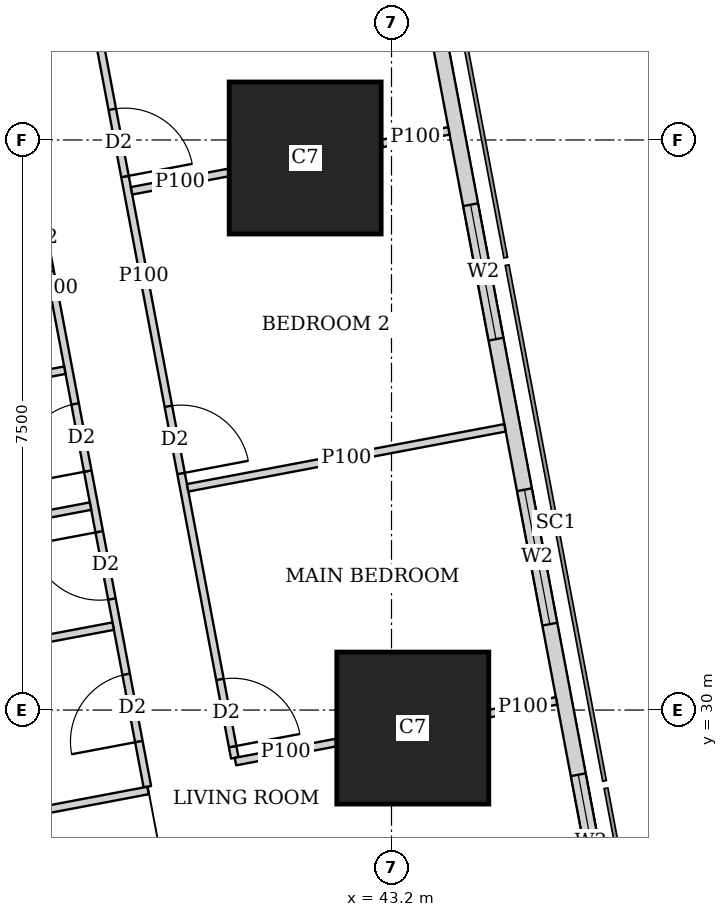
"""IFC4 building model, lengths in metres.
Left out: names, types, materials, properties, quantities, classifications, styles, units other than length and angle.
Written with IfcOpenShell. Run it as: python <this file> out.ifc"""

import sys

from ifc_helpers import new_model, si_unit, direction, frame, frame_2d, origin, origin_2d, place, context, subcontext, project, spatial, rectangle, extrude, element, fill, save


model = new_model("IFC4")
c1 = context("Model", 3, precision=1e-05, world=origin(), true_north=direction((0.0, 1.0)))
c2 = subcontext(c1, "Body", "Model", "MODEL_VIEW")
j1 = project(units=[si_unit("LENGTHUNIT", "METRE"), si_unit("PLANEANGLEUNIT", "RADIAN")], contexts=[c1])
p1 = place(None, origin())
s1 = spatial("IfcSite", under=j1, at=p1, CompositionType="ELEMENT")
p2 = place(p1, origin())
s2 = spatial("IfcBuilding", under=s1, at=p2, CompositionType="ELEMENT")
p3 = place(p2, frame((0.0, 0.0, 266.6)))
s3 = spatial("IfcBuildingStorey", under=s2, at=p3, CompositionType="ELEMENT", Elevation=266.6)
for number, where, z_axis, x_axis in (
    (1, (43.48, 29.763, 0.0), (0.0, 0.0, 1.0), (1.0, 0.0, 0.0)),
    (2, (42.064, 37.263, 0.0), (0.0, 0.0, 1.0), (1.0, 0.0, 0.0)),
):
    element("IfcColumn", number, at=place(p3, frame(where, z_axis=z_axis, x_axis=x_axis)), inside=s3, PredefinedType="COLUMN", context=c2, shape_type="SweptSolid", body=[
        extrude(rectangle(XDim=2.0, YDim=2.0, at=origin_2d()), origin(), (0.0, 0.0, 1.0), 3.75),
    ])
p4 = place(p3, frame((49.684, 7.832, 0.0), z_axis=(0.0, 0.0, 1.0), x_axis=(-0.185616669694, 0.982622232565, 0.0)))
e3 = element("IfcWall", 3, at=p4, inside=s3, PredefinedType="SOLIDWALL", context=c2, shape_type="SweptSolid", body=[
    extrude(rectangle(XDim=36.0, YDim=0.2, at=frame_2d((18.0, 0.0))), origin(), (0.0, 0.0, 1.0), 3.5),
])
p5 = place(p4, frame((2.518, 0.0, 0.9)))
e4 = element("IfcOpeningElement", 4, at=p5, cuts=e3, PredefinedType="OPENING", context=c2, shape_type="SweptSolid", body=[
    extrude(rectangle(XDim=2.4, YDim=1.5, at=frame_2d((1.2, 0.75))), frame((0.0, 0.11, 0.0), z_axis=(0.0, -1.0, 0.0), x_axis=(1.0, 0.0, 0.0)), (0.0, 0.0, 1.0), 0.22),
])
p6 = place(p4, frame((8.444, 0.0, 0.9)))
e5 = element("IfcOpeningElement", 5, at=p6, cuts=e3, PredefinedType="OPENING", context=c2, shape_type="SweptSolid", body=[
    extrude(rectangle(XDim=1.8, YDim=1.5, at=frame_2d((0.9, 0.75))), frame((0.0, 0.11, 0.0), z_axis=(0.0, -1.0, 0.0), x_axis=(1.0, 0.0, 0.0)), (0.0, 0.0, 1.0), 0.22),
])
p7 = place(p4, frame((12.261, 0.0, 0.9)))
e6 = element("IfcOpeningElement", 6, at=p7, cuts=e3, PredefinedType="OPENING", context=c2, shape_type="SweptSolid", body=[
    extrude(rectangle(XDim=1.8, YDim=1.5, at=frame_2d((0.9, 0.75))), frame((0.0, 0.11, 0.0), z_axis=(0.0, -1.0, 0.0), x_axis=(1.0, 0.0, 0.0)), (0.0, 0.0, 1.0), 0.22),
])
p8 = place(p4, frame((16.078, 0.0, 0.9)))
e7 = element("IfcOpeningElement", 7, at=p8, cuts=e3, PredefinedType="OPENING", context=c2, shape_type="SweptSolid", body=[
    extrude(rectangle(XDim=1.8, YDim=1.5, at=frame_2d((0.9, 0.75))), frame((0.0, 0.11, 0.0), z_axis=(0.0, -1.0, 0.0), x_axis=(1.0, 0.0, 0.0)), (0.0, 0.0, 1.0), 0.22),
])
p9 = place(p4, frame((19.894, 0.0, 0.9)))
e8 = element("IfcOpeningElement", 8, at=p9, cuts=e3, PredefinedType="OPENING", context=c2, shape_type="SweptSolid", body=[
    extrude(rectangle(XDim=1.8, YDim=1.5, at=frame_2d((0.9, 0.75))), frame((0.0, 0.11, 0.0), z_axis=(0.0, -1.0, 0.0), x_axis=(1.0, 0.0, 0.0)), (0.0, 0.0, 1.0), 0.22),
])
p10 = place(p4, frame((23.71, 0.0, 0.9)))
e9 = element("IfcOpeningElement", 9, at=p10, cuts=e3, PredefinedType="OPENING", context=c2, shape_type="SweptSolid", body=[
    extrude(rectangle(XDim=1.8, YDim=1.5, at=frame_2d((0.9, 0.75))), frame((0.0, 0.11, 0.0), z_axis=(0.0, -1.0, 0.0), x_axis=(1.0, 0.0, 0.0)), (0.0, 0.0, 1.0), 0.22),
])
p11 = place(p4, frame((27.526, 0.0, 0.9)))
e10 = element("IfcOpeningElement", 10, at=p11, cuts=e3, PredefinedType="OPENING", context=c2, shape_type="SweptSolid", body=[
    extrude(rectangle(XDim=1.8, YDim=1.5, at=frame_2d((0.9, 0.75))), frame((0.0, 0.11, 0.0), z_axis=(0.0, -1.0, 0.0), x_axis=(1.0, 0.0, 0.0)), (0.0, 0.0, 1.0), 0.22),
])
p12 = place(p4, frame((32.046, 0.0, 0.9)))
e11 = element("IfcOpeningElement", 11, at=p12, cuts=e3, PredefinedType="OPENING", context=c2, shape_type="SweptSolid", body=[
    extrude(rectangle(XDim=1.8, YDim=1.5, at=frame_2d((0.9, 0.75))), frame((0.0, 0.11, 0.0), z_axis=(0.0, -1.0, 0.0), x_axis=(1.0, 0.0, 0.0)), (0.0, 0.0, 1.0), 0.22),
])
p13 = place(p3, frame((34.036, 42.186, 0.0), z_axis=(0.0, 0.0, 1.0), x_axis=(0.185593518645, -0.9826266055, 0.0)))
e12 = element("IfcWall", 12, at=p13, inside=s3, PredefinedType="SOLIDWALL", context=c2, shape_type="SweptSolid", body=[
    extrude(rectangle(XDim=35.961, YDim=0.15, at=frame_2d((17.98, 0.0))), origin(), (0.0, 0.0, 1.0), 2.5),
])
p14 = place(p13, frame((15.529, 0.0, 0.0)))
e13 = element("IfcOpeningElement", 13, at=p14, cuts=e12, PredefinedType="OPENING", context=c2, shape_type="SweptSolid", body=[
    extrude(rectangle(XDim=1.0, YDim=2.1, at=frame_2d((0.5, 1.05))), frame((0.0, 0.085, 0.0), z_axis=(0.0, -1.0, 0.0), x_axis=(1.0, 0.0, 0.0)), (0.0, 0.0, 1.0), 0.17),
])
p15 = place(p13, frame((19.345, 0.0, 0.0)))
e14 = element("IfcOpeningElement", 14, at=p15, cuts=e12, PredefinedType="OPENING", context=c2, shape_type="SweptSolid", body=[
    extrude(rectangle(XDim=1.0, YDim=2.1, at=frame_2d((0.5, 1.05))), frame((0.0, 0.085, 0.0), z_axis=(0.0, -1.0, 0.0), x_axis=(1.0, 0.0, 0.0)), (0.0, 0.0, 1.0), 0.17),
])
p16 = place(p13, frame((30.594, 0.0, 0.0)))
e15 = element("IfcOpeningElement", 15, at=p16, cuts=e12, PredefinedType="OPENING", context=c2, shape_type="SweptSolid", body=[
    extrude(rectangle(XDim=1.0, YDim=2.1, at=frame_2d((0.5, 1.05))), frame((0.0, 0.085, 0.0), z_axis=(0.0, -1.0, 0.0), x_axis=(1.0, 0.0, 0.0)), (0.0, 0.0, 1.0), 0.17),
])
p17 = place(p3, frame((38.744, 42.045, 0.0), z_axis=(0.0, 0.0, 1.0), x_axis=(0.185614085367, -0.982622720739, 0.0)))
e16 = element("IfcWall", 16, at=p17, inside=s3, PredefinedType="PARTITIONING", context=c2, shape_type="SweptSolid", body=[
    extrude(rectangle(XDim=12.898, YDim=0.1, at=frame_2d((6.449, 0.0))), origin(), (0.0, 0.0, 1.0), 2.5),
])
p18 = place(p17, frame((11.848, 0.0, 0.0)))
e17 = element("IfcOpeningElement", 17, at=p18, cuts=e16, PredefinedType="OPENING", context=c2, shape_type="SweptSolid", body=[
    extrude(rectangle(XDim=0.9, YDim=2.1, at=frame_2d((0.45, 1.05))), frame((0.0, 0.06, 0.0), z_axis=(0.0, -1.0, 0.0), x_axis=(1.0, 0.0, 0.0)), (0.0, 0.0, 1.0), 0.12),
])
p19 = place(p17, frame((8.191, 0.0, 0.0)))
e18 = element("IfcOpeningElement", 18, at=p19, cuts=e16, PredefinedType="OPENING", context=c2, shape_type="SweptSolid", body=[
    extrude(rectangle(XDim=0.9, YDim=2.1, at=frame_2d((0.45, 1.05))), frame((0.0, 0.06, 0.0), z_axis=(0.0, -1.0, 0.0), x_axis=(1.0, 0.0, 0.0)), (0.0, 0.0, 1.0), 0.12),
])
p20 = place(p17, frame((4.215, 0.0, 0.0)))
e19 = element("IfcOpeningElement", 19, at=p20, cuts=e16, PredefinedType="OPENING", context=c2, shape_type="SweptSolid", body=[
    extrude(rectangle(XDim=0.9, YDim=2.1, at=frame_2d((0.45, 1.05))), frame((0.0, 0.06, 0.0), z_axis=(0.0, -1.0, 0.0), x_axis=(1.0, 0.0, 0.0)), (0.0, 0.0, 1.0), 0.12),
])
p21 = place(p3, frame((37.511, 42.109, 0.0), z_axis=(0.0, 0.0, 1.0), x_axis=(0.185550464988, -0.982634736279, 0.0)))
e20 = element("IfcWall", 20, at=p21, inside=s3, PredefinedType="PARTITIONING", context=c2, shape_type="SweptSolid", body=[
    extrude(rectangle(XDim=13.35, YDim=0.1, at=frame_2d((6.675, 0.0))), origin(), (0.0, 0.0, 1.0), 2.5),
])
p22 = place(p21, frame((11.845, 0.0, 0.0)))
e21 = element("IfcOpeningElement", 21, at=p22, cuts=e20, PredefinedType="OPENING", context=c2, shape_type="SweptSolid", body=[
    extrude(rectangle(XDim=0.9, YDim=2.1, at=frame_2d((0.45, 1.05))), frame((0.0, 0.06, 0.0), z_axis=(0.0, -1.0, 0.0), x_axis=(1.0, 0.0, 0.0)), (0.0, 0.0, 1.0), 0.12),
])
p23 = place(p21, frame((8.224, 0.0, 0.0)))
e22 = element("IfcOpeningElement", 22, at=p23, cuts=e20, PredefinedType="OPENING", context=c2, shape_type="SweptSolid", body=[
    extrude(rectangle(XDim=0.9, YDim=2.1, at=frame_2d((0.45, 1.05))), frame((0.0, 0.06, 0.0), z_axis=(0.0, -1.0, 0.0), x_axis=(1.0, 0.0, 0.0)), (0.0, 0.0, 1.0), 0.12),
])
p24 = place(p21, frame((2.65, 0.0, 0.0)))
e23 = element("IfcOpeningElement", 23, at=p24, cuts=e20, PredefinedType="OPENING", context=c2, shape_type="SweptSolid", body=[
    extrude(rectangle(XDim=0.9, YDim=2.1, at=frame_2d((0.45, 1.05))), frame((0.0, 0.06, 0.0), z_axis=(0.0, -1.0, 0.0), x_axis=(1.0, 0.0, 0.0)), (0.0, 0.0, 1.0), 0.12),
])
p25 = place(p21, frame((9.936, 0.0, 0.0)))
e24 = element("IfcOpeningElement", 24, at=p25, cuts=e20, PredefinedType="OPENING", context=c2, shape_type="SweptSolid", body=[
    extrude(rectangle(XDim=0.9, YDim=2.1, at=frame_2d((0.45, 1.05))), frame((0.0, 0.06, 0.0), z_axis=(0.0, -1.0, 0.0), x_axis=(1.0, 0.0, 0.0)), (0.0, 0.0, 1.0), 0.12),
])
p26 = place(p21, frame((5.555, 0.0, 0.0)))
e25 = element("IfcOpeningElement", 25, at=p26, cuts=e20, PredefinedType="OPENING", context=c2, shape_type="SweptSolid", body=[
    extrude(rectangle(XDim=0.9, YDim=2.1, at=frame_2d((0.45, 1.05))), frame((0.0, 0.06, 0.0), z_axis=(0.0, -1.0, 0.0), x_axis=(1.0, 0.0, 0.0)), (0.0, 0.0, 1.0), 0.12),
])
p27 = place(p3, frame((43.955, 37.62, 0.0), z_axis=(0.0, 0.0, 1.0), x_axis=(-0.982708424405, -0.18515980288, 0.0)))
e26 = element("IfcWall", 26, at=p27, inside=s3, PredefinedType="PARTITIONING", context=c2, shape_type="SweptSolid", body=[
    extrude(rectangle(XDim=0.897, YDim=0.1, at=frame_2d((0.448, 0.0))), origin(), (0.0, 0.0, 1.0), 3.5),
])
p28 = place(p3, frame((41.054, 37.072, 0.0), z_axis=(0.0, 0.0, 1.0), x_axis=(-0.982576752117, -0.185857273733, 0.0)))
e27 = element("IfcWall", 27, at=p28, inside=s3, PredefinedType="PARTITIONING", context=c2, shape_type="SweptSolid", body=[
    extrude(rectangle(XDim=1.297, YDim=0.1, at=frame_2d((0.648, 0.0))), origin(), (0.0, 0.0, 1.0), 3.5),
])
p29 = place(p3, frame((44.693, 33.713, 0.0), z_axis=(0.0, 0.0, 1.0), x_axis=(-0.982615600536, -0.185651775062, 0.0)))
e28 = element("IfcWall", 28, at=p29, inside=s3, PredefinedType="PARTITIONING", context=c2, shape_type="SweptSolid", body=[
    extrude(rectangle(XDim=4.249, YDim=0.1, at=frame_2d((2.125, 0.0))), origin(), (0.0, 0.0, 1.0), 2.5),
])
p30 = place(p3, frame((45.372, 30.121, 0.0), z_axis=(0.0, 0.0, 1.0), x_axis=(-0.982547416156, -0.186012297994, 0.0)))
e29 = element("IfcWall", 29, at=p30, inside=s3, PredefinedType="PARTITIONING", context=c2, shape_type="SweptSolid", body=[
    extrude(rectangle(XDim=0.898, YDim=0.1, at=frame_2d((0.449, 0.0))), origin(), (0.0, 0.0, 1.0), 3.5),
])
p31 = place(p3, frame((42.47, 29.572, 0.0), z_axis=(0.0, 0.0, 1.0), x_axis=(-0.982610503289, -0.185678751683, 0.0)))
e30 = element("IfcWall", 30, at=p31, inside=s3, PredefinedType="PARTITIONING", context=c2, shape_type="SweptSolid", body=[
    extrude(rectangle(XDim=1.346, YDim=0.1, at=frame_2d((0.673, 0.0))), origin(), (0.0, 0.0, 1.0), 2.5),
])
p32 = place(p3, frame((39.24, 32.683, 0.0), z_axis=(0.0, 0.0, 1.0), x_axis=(-0.982607026909, -0.185697147715, 0.0)))
e31 = element("IfcWall", 31, at=p32, inside=s3, PredefinedType="PARTITIONING", context=c2, shape_type="SweptSolid", body=[
    extrude(rectangle(XDim=3.275, YDim=0.1, at=frame_2d((1.637, 0.0))), origin(), (0.0, 0.0, 1.0), 3.5),
])
p33 = place(p3, frame((39.997, 28.942, 0.0), z_axis=(0.0, 0.0, 1.0), x_axis=(-0.982569883123, -0.185893584556, 0.0)))
e32 = element("IfcWall", 32, at=p33, inside=s3, PredefinedType="PARTITIONING", context=c2, shape_type="SweptSolid", body=[
    extrude(rectangle(XDim=3.324, YDim=0.1, at=frame_2d((1.662, 0.0))), origin(), (0.0, 0.0, 1.0), 3.5),
])
p34 = place(p3, frame((39.538, 31.104, 0.0), z_axis=(0.0, 0.0, 1.0), x_axis=(-0.982620626894, -0.185625169636, 0.0)))
e33 = element("IfcWall", 33, at=p34, inside=s3, PredefinedType="PARTITIONING", context=c2, shape_type="SweptSolid", body=[
    extrude(rectangle(XDim=3.275, YDim=0.1, at=frame_2d((1.637, 0.0))), origin(), (0.0, 0.0, 1.0), 2.5),
])
p35 = place(p3, frame((38.902, 34.471, 0.0), z_axis=(0.0, 0.0, 1.0), x_axis=(-0.982674977865, -0.185337227447, 0.0)))
e34 = element("IfcWall", 34, at=p35, inside=s3, PredefinedType="PARTITIONING", context=c2, shape_type="SweptSolid", body=[
    extrude(rectangle(XDim=3.275, YDim=0.1, at=frame_2d((1.637, 0.0))), origin(), (0.0, 0.0, 1.0), 3.5),
])
p36 = place(p9, origin())
e35 = element("IfcWindow", 35, at=p36, inside=s3, PartitioningType="SINGLE_PANEL", PredefinedType="WINDOW", context=c2, shape_type="SweptSolid", body=[
    extrude(rectangle(XDim=1.8, YDim=1.5, at=frame_2d((0.9, 0.75))), frame((0.0, 0.03, 0.0), z_axis=(0.0, -1.0, 0.0), x_axis=(1.0, 0.0, 0.0)), (0.0, 0.0, 1.0), 0.06),
])
fill(e8, e35)
p37 = place(p10, origin())
e36 = element("IfcWindow", 36, at=p37, inside=s3, PartitioningType="SINGLE_PANEL", PredefinedType="WINDOW", context=c2, shape_type="SweptSolid", body=[
    extrude(rectangle(XDim=1.8, YDim=1.5, at=frame_2d((0.9, 0.75))), frame((0.0, 0.03, 0.0), z_axis=(0.0, -1.0, 0.0), x_axis=(1.0, 0.0, 0.0)), (0.0, 0.0, 1.0), 0.06),
])
fill(e9, e36)
p38 = place(p11, origin())
e37 = element("IfcWindow", 37, at=p38, inside=s3, PartitioningType="SINGLE_PANEL", PredefinedType="WINDOW", context=c2, shape_type="SweptSolid", body=[
    extrude(rectangle(XDim=1.8, YDim=1.5, at=frame_2d((0.9, 0.75))), frame((0.0, 0.03, 0.0), z_axis=(0.0, -1.0, 0.0), x_axis=(1.0, 0.0, 0.0)), (0.0, 0.0, 1.0), 0.06),
])
fill(e10, e37)
p39 = place(p18, origin())
e38 = element("IfcDoor", 38, at=p39, inside=s3, OperationType="SINGLE_SWING_RIGHT", PredefinedType="DOOR", context=c2, shape_type="SweptSolid", body=[
    extrude(rectangle(XDim=0.9, YDim=2.1, at=frame_2d((0.45, 1.05))), frame((0.0, 0.025, 0.0), z_axis=(0.0, -1.0, 0.0), x_axis=(1.0, 0.0, 0.0)), (0.0, 0.0, 1.0), 0.05),
])
fill(e17, e38)
p40 = place(p19, origin())
e39 = element("IfcDoor", 39, at=p40, inside=s3, OperationType="SINGLE_SWING_RIGHT", PredefinedType="DOOR", context=c2, shape_type="SweptSolid", body=[
    extrude(rectangle(XDim=0.9, YDim=2.1, at=frame_2d((0.45, 1.05))), frame((0.0, 0.025, 0.0), z_axis=(0.0, -1.0, 0.0), x_axis=(1.0, 0.0, 0.0)), (0.0, 0.0, 1.0), 0.05),
])
fill(e18, e39)
p41 = place(p20, origin())
e40 = element("IfcDoor", 40, at=p41, inside=s3, OperationType="SINGLE_SWING_RIGHT", PredefinedType="DOOR", context=c2, shape_type="SweptSolid", body=[
    extrude(rectangle(XDim=0.9, YDim=2.1, at=frame_2d((0.45, 1.05))), frame((0.0, 0.025, 0.0), z_axis=(0.0, -1.0, 0.0), x_axis=(1.0, 0.0, 0.0)), (0.0, 0.0, 1.0), 0.05),
])
fill(e19, e40)
p42 = place(p22, origin())
e41 = element("IfcDoor", 41, at=p42, inside=s3, OperationType="SINGLE_SWING_LEFT", PredefinedType="DOOR", context=c2, shape_type="SweptSolid", body=[
    extrude(rectangle(XDim=0.9, YDim=2.1, at=frame_2d((0.45, 1.05))), frame((0.0, 0.025, 0.0), z_axis=(0.0, -1.0, 0.0), x_axis=(1.0, 0.0, 0.0)), (0.0, 0.0, 1.0), 0.05),
])
fill(e21, e41)
p43 = place(p23, origin())
e42 = element("IfcDoor", 42, at=p43, inside=s3, OperationType="SINGLE_SWING_LEFT", PredefinedType="DOOR", context=c2, shape_type="SweptSolid", body=[
    extrude(rectangle(XDim=0.9, YDim=2.1, at=frame_2d((0.45, 1.05))), frame((0.0, 0.025, 0.0), z_axis=(0.0, -1.0, 0.0), x_axis=(1.0, 0.0, 0.0)), (0.0, 0.0, 1.0), 0.05),
])
fill(e22, e42)
p44 = place(p25, origin())
e43 = element("IfcDoor", 43, at=p44, inside=s3, OperationType="SINGLE_SWING_RIGHT", PredefinedType="DOOR", context=c2, shape_type="SweptSolid", body=[
    extrude(rectangle(XDim=0.9, YDim=2.1, at=frame_2d((0.45, 1.05))), frame((0.0, 0.025, 0.0), z_axis=(0.0, -1.0, 0.0), x_axis=(1.0, 0.0, 0.0)), (0.0, 0.0, 1.0), 0.05),
])
fill(e24, e43)
p45 = place(p26, origin())
e44 = element("IfcDoor", 44, at=p45, inside=s3, OperationType="SINGLE_SWING_RIGHT", PredefinedType="DOOR", context=c2, shape_type="SweptSolid", body=[
    extrude(rectangle(XDim=0.9, YDim=2.1, at=frame_2d((0.45, 1.05))), frame((0.0, 0.025, 0.0), z_axis=(0.0, -1.0, 0.0), x_axis=(1.0, 0.0, 0.0)), (0.0, 0.0, 1.0), 0.05),
])
fill(e25, e44)
save(model, sys.argv[1])
